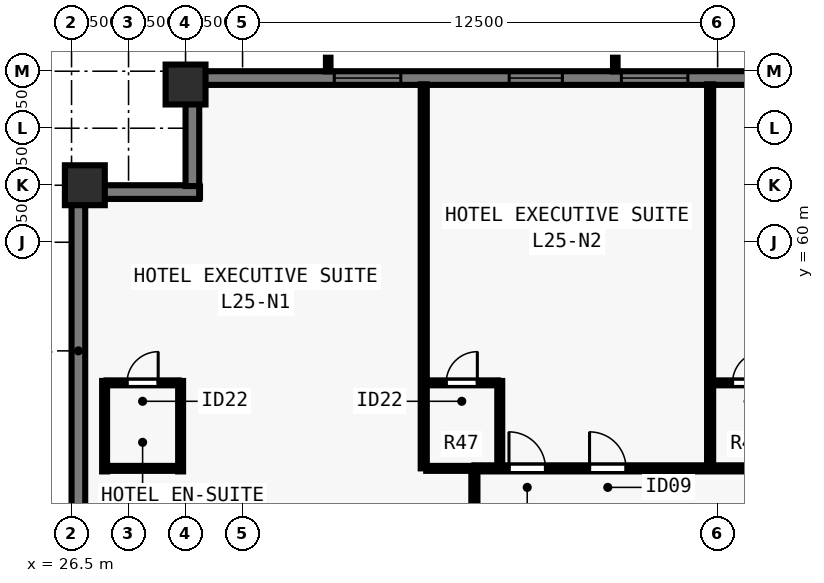
"""IFC4 building model, lengths in metres.
Left out: names, types, materials, properties, quantities, classifications, styles, units other than length and angle.
Written with IfcOpenShell. Run it as: python <this file> out.ifc"""

import sys

from ifc_helpers import new_model, si_unit, direction, frame, frame_2d, origin, origin_2d, place, context, subcontext, project, spatial, rectangle, extrude, element, fill, save


model = new_model("IFC4")
c1 = context("Model", 3, precision=1e-05, world=origin(), true_north=direction((0.0, 1.0)))
c2 = subcontext(c1, "Body", "Model", "MODEL_VIEW")
j1 = project(units=[si_unit("LENGTHUNIT", "METRE"), si_unit("PLANEANGLEUNIT", "RADIAN")], contexts=[c1])
p1 = place(None, origin())
s1 = spatial("IfcSite", under=j1, at=p1, CompositionType="ELEMENT")
p2 = place(p1, origin())
s2 = spatial("IfcBuilding", under=s1, at=p2, CompositionType="ELEMENT")
p3 = place(p2, frame((0.0, 0.0, 93.5)))
s3 = spatial("IfcBuildingStorey", under=s2, at=p3, CompositionType="ELEMENT", Elevation=93.5)
for number, where, z_axis, x_axis in (
    (1, (29.5, 64.15, 0.0), (0.0, 0.0, 1.0), (1.0, 0.0, 0.0)),
    (2, (26.85, 61.5, 0.0), (0.0, 0.0, 1.0), (0.0, 1.0, 0.0)),
):
    element("IfcColumn", number, at=place(p3, frame(where, z_axis=z_axis, x_axis=x_axis)), inside=s3, PredefinedType="COLUMN", context=c2, shape_type="SweptSolid", body=[
        extrude(rectangle(XDim=1.05, YDim=1.05, at=origin_2d()), origin(), (0.0, 0.0, 1.0), 3.5),
    ])
p4 = place(p3, frame((26.68, 16.5, 0.0), z_axis=(0.0, 0.0, 1.0), x_axis=(0.0, 1.0, 0.0)))
e3 = element("IfcWall", 3, at=p4, inside=s3, PredefinedType="SOLIDWALL", context=c2, shape_type="SweptSolid", body=[
    extrude(rectangle(XDim=44.662, YDim=0.36, at=frame_2d((22.331, 0.0))), origin(), (0.0, 0.0, 1.0), 3.24),
])
p5 = place(p4, frame((8.19, 0.0, 0.8)))
e4 = element("IfcOpeningElement", 4, at=p5, cuts=e3, PredefinedType="OPENING", context=c2, shape_type="SweptSolid", body=[
    extrude(rectangle(XDim=1.4, YDim=1.504, at=frame_2d((0.7, 0.752))), frame((0.0, 0.19, 0.0), z_axis=(0.0, -1.0, 0.0), x_axis=(1.0, 0.0, 0.0)), (0.0, 0.0, 1.0), 0.38),
])
p6 = place(p4, frame((11.375, 0.0, 0.8)))
e5 = element("IfcOpeningElement", 5, at=p6, cuts=e3, PredefinedType="OPENING", context=c2, shape_type="SweptSolid", body=[
    extrude(rectangle(XDim=1.75, YDim=1.504, at=frame_2d((0.875, 0.752))), frame((0.0, 0.19, 0.0), z_axis=(0.0, -1.0, 0.0), x_axis=(1.0, 0.0, 0.0)), (0.0, 0.0, 1.0), 0.38),
])
p7 = place(p4, frame((14.911, 0.0, 0.8)))
e6 = element("IfcOpeningElement", 6, at=p7, cuts=e3, PredefinedType="OPENING", context=c2, shape_type="SweptSolid", body=[
    extrude(rectangle(XDim=1.4, YDim=1.504, at=frame_2d((0.7, 0.752))), frame((0.0, 0.19, 0.0), z_axis=(0.0, -1.0, 0.0), x_axis=(1.0, 0.0, 0.0)), (0.0, 0.0, 1.0), 0.38),
])
p8 = place(p4, frame((18.546, 0.0, 0.8)))
e7 = element("IfcOpeningElement", 7, at=p8, cuts=e3, PredefinedType="OPENING", context=c2, shape_type="SweptSolid", body=[
    extrude(rectangle(XDim=1.75, YDim=1.504, at=frame_2d((0.875, 0.752))), frame((0.0, 0.19, 0.0), z_axis=(0.0, -1.0, 0.0), x_axis=(1.0, 0.0, 0.0)), (0.0, 0.0, 1.0), 0.38),
])
p9 = place(p4, frame((22.881, 0.0, 0.8)))
e8 = element("IfcOpeningElement", 8, at=p9, cuts=e3, PredefinedType="OPENING", context=c2, shape_type="SweptSolid", body=[
    extrude(rectangle(XDim=1.4, YDim=1.504, at=frame_2d((0.7, 0.752))), frame((0.0, 0.19, 0.0), z_axis=(0.0, -1.0, 0.0), x_axis=(1.0, 0.0, 0.0)), (0.0, 0.0, 1.0), 0.38),
])
p10 = place(p4, frame((28.351, 0.0, 0.8)))
e9 = element("IfcOpeningElement", 9, at=p10, cuts=e3, PredefinedType="OPENING", context=c2, shape_type="SweptSolid", body=[
    extrude(rectangle(XDim=1.4, YDim=1.504, at=frame_2d((0.7, 0.752))), frame((0.0, 0.19, 0.0), z_axis=(0.0, -1.0, 0.0), x_axis=(1.0, 0.0, 0.0)), (0.0, 0.0, 1.0), 0.38),
])
p11 = place(p4, frame((31.537, 0.0, 0.8)))
e10 = element("IfcOpeningElement", 10, at=p11, cuts=e3, PredefinedType="OPENING", context=c2, shape_type="SweptSolid", body=[
    extrude(rectangle(XDim=1.75, YDim=1.504, at=frame_2d((0.875, 0.752))), frame((0.0, 0.19, 0.0), z_axis=(0.0, -1.0, 0.0), x_axis=(1.0, 0.0, 0.0)), (0.0, 0.0, 1.0), 0.38),
])
p12 = place(p4, frame((35.072, 0.0, 0.8)))
e11 = element("IfcOpeningElement", 11, at=p12, cuts=e3, PredefinedType="OPENING", context=c2, shape_type="SweptSolid", body=[
    extrude(rectangle(XDim=1.4, YDim=1.504, at=frame_2d((0.7, 0.752))), frame((0.0, 0.19, 0.0), z_axis=(0.0, -1.0, 0.0), x_axis=(1.0, 0.0, 0.0)), (0.0, 0.0, 1.0), 0.38),
])
p13 = place(p3, frame((26.5, 61.32, 0.0), z_axis=(0.0, 0.0, 1.0), x_axis=(1.0, 0.0, 0.0)))
e12 = element("IfcWall", 12, at=p13, inside=s3, PredefinedType="SOLIDWALL", context=c2, shape_type="SweptSolid", body=[
    extrude(rectangle(XDim=3.36, YDim=0.36, at=frame_2d((1.68, 0.0))), origin(), (0.0, 0.0, 1.0), 3.24),
])
p14 = place(p3, frame((29.68, 61.478, 0.0), z_axis=(0.0, 0.0, 1.0), x_axis=(0.0, 1.0, 0.0)))
e13 = element("IfcWall", 13, at=p14, inside=s3, PredefinedType="SOLIDWALL", context=c2, shape_type="SweptSolid", body=[
    extrude(rectangle(XDim=2.684, YDim=0.36, at=frame_2d((1.342, 0.0))), origin(), (0.0, 0.0, 1.0), 3.24),
])
p15 = place(p3, frame((29.5, 64.32, 0.0), z_axis=(0.0, 0.0, 1.0), x_axis=(1.0, 0.0, 0.0)))
e14 = element("IfcWall", 14, at=p15, inside=s3, PredefinedType="SOLIDWALL", context=c2, shape_type="SweptSolid", body=[
    extrude(rectangle(XDim=29.162, YDim=0.36, at=frame_2d((14.581, 0.0))), origin(), (0.0, 0.0, 1.0), 3.24),
])
p16 = place(p15, frame((3.914, 0.0, 0.8)))
e15 = element("IfcOpeningElement", 15, at=p16, cuts=e14, PredefinedType="OPENING", context=c2, shape_type="SweptSolid", body=[
    extrude(rectangle(XDim=1.75, YDim=1.504, at=frame_2d((0.875, 0.752))), frame((0.0, 0.19, 0.0), z_axis=(0.0, -1.0, 0.0), x_axis=(1.0, 0.0, 0.0)), (0.0, 0.0, 1.0), 0.38),
])
p17 = place(p15, frame((8.515, 0.0, 0.8)))
e16 = element("IfcOpeningElement", 16, at=p17, cuts=e14, PredefinedType="OPENING", context=c2, shape_type="SweptSolid", body=[
    extrude(rectangle(XDim=1.4, YDim=1.504, at=frame_2d((0.7, 0.752))), frame((0.0, 0.19, 0.0), z_axis=(0.0, -1.0, 0.0), x_axis=(1.0, 0.0, 0.0)), (0.0, 0.0, 1.0), 0.38),
])
p18 = place(p15, frame((11.468, 0.0, 0.8)))
e17 = element("IfcOpeningElement", 17, at=p18, cuts=e14, PredefinedType="OPENING", context=c2, shape_type="SweptSolid", body=[
    extrude(rectangle(XDim=1.75, YDim=1.504, at=frame_2d((0.875, 0.752))), frame((0.0, 0.19, 0.0), z_axis=(0.0, -1.0, 0.0), x_axis=(1.0, 0.0, 0.0)), (0.0, 0.0, 1.0), 0.38),
])
p19 = place(p15, frame((15.219, 0.0, 0.8)))
e18 = element("IfcOpeningElement", 18, at=p19, cuts=e14, PredefinedType="OPENING", context=c2, shape_type="SweptSolid", body=[
    extrude(rectangle(XDim=1.4, YDim=1.504, at=frame_2d((0.7, 0.752))), frame((0.0, 0.19, 0.0), z_axis=(0.0, -1.0, 0.0), x_axis=(1.0, 0.0, 0.0)), (0.0, 0.0, 1.0), 0.38),
])
p20 = place(p15, frame((19.072, 0.0, 0.8)))
e19 = element("IfcOpeningElement", 19, at=p20, cuts=e14, PredefinedType="OPENING", context=c2, shape_type="SweptSolid", body=[
    extrude(rectangle(XDim=1.75, YDim=1.504, at=frame_2d((0.875, 0.752))), frame((0.0, 0.19, 0.0), z_axis=(0.0, -1.0, 0.0), x_axis=(1.0, 0.0, 0.0)), (0.0, 0.0, 1.0), 0.38),
])
p21 = place(p15, frame((23.674, 0.0, 0.8)))
e20 = element("IfcOpeningElement", 20, at=p21, cuts=e14, PredefinedType="OPENING", context=c2, shape_type="SweptSolid", body=[
    extrude(rectangle(XDim=1.4, YDim=1.504, at=frame_2d((0.7, 0.752))), frame((0.0, 0.19, 0.0), z_axis=(0.0, -1.0, 0.0), x_axis=(1.0, 0.0, 0.0)), (0.0, 0.0, 1.0), 0.38),
])
p22 = place(p3, frame((37.1, 54.05, 0.0), z_axis=(0.0, 0.0, 1.0), x_axis=(1.0, 0.0, 0.0)))
e21 = element("IfcWall", 21, at=p22, inside=s3, PredefinedType="PARTITIONING", context=c2, shape_type="SweptSolid", body=[
    extrude(rectangle(XDim=29.8, YDim=0.16, at=frame_2d((14.9, 0.0))), origin(), (0.0, 0.0, 1.0), 3.24),
])
p23 = place(p22, frame((0.91, 0.0, 0.0)))
e22 = element("IfcOpeningElement", 22, at=p23, cuts=e21, PredefinedType="OPENING", context=c2, shape_type="SweptSolid", body=[
    extrude(rectangle(XDim=0.96, YDim=2.15, at=frame_2d((0.48, 1.075))), frame((0.0, 0.09, 0.0), z_axis=(0.0, -1.0, 0.0), x_axis=(1.0, 0.0, 0.0)), (0.0, 0.0, 1.0), 0.18),
])
p24 = place(p22, frame((3.03, 0.0, 0.0)))
e23 = element("IfcOpeningElement", 23, at=p24, cuts=e21, PredefinedType="OPENING", context=c2, shape_type="SweptSolid", body=[
    extrude(rectangle(XDim=0.96, YDim=2.15, at=frame_2d((0.48, 1.075))), frame((0.0, 0.09, 0.0), z_axis=(0.0, -1.0, 0.0), x_axis=(1.0, 0.0, 0.0)), (0.0, 0.0, 1.0), 0.18),
])
p25 = place(p22, frame((11.39, 0.0, 0.0)))
e24 = element("IfcOpeningElement", 24, at=p25, cuts=e21, PredefinedType="OPENING", context=c2, shape_type="SweptSolid", body=[
    extrude(rectangle(XDim=0.96, YDim=2.15, at=frame_2d((0.48, 1.075))), frame((0.0, 0.09, 0.0), z_axis=(0.0, -1.0, 0.0), x_axis=(1.0, 0.0, 0.0)), (0.0, 0.0, 1.0), 0.18),
])
p26 = place(p22, frame((19.75, 0.0, 0.0)))
e25 = element("IfcOpeningElement", 25, at=p26, cuts=e21, PredefinedType="OPENING", context=c2, shape_type="SweptSolid", body=[
    extrude(rectangle(XDim=0.96, YDim=2.15, at=frame_2d((0.48, 1.075))), frame((0.0, 0.09, 0.0), z_axis=(0.0, -1.0, 0.0), x_axis=(1.0, 0.0, 0.0)), (0.0, 0.0, 1.0), 0.18),
])
p27 = place(p22, frame((26.931, 0.0, 0.0)))
e26 = element("IfcOpeningElement", 26, at=p27, cuts=e21, PredefinedType="OPENING", context=c2, shape_type="SweptSolid", body=[
    extrude(rectangle(XDim=0.96, YDim=2.15, at=frame_2d((0.48, 1.075))), frame((0.0, 0.09, 0.0), z_axis=(0.0, -1.0, 0.0), x_axis=(1.0, 0.0, 0.0)), (0.0, 0.0, 1.0), 0.18),
])
p28 = place(p22, frame((28.48, 0.0, 0.0)))
e27 = element("IfcOpeningElement", 27, at=p28, cuts=e21, PredefinedType="OPENING", context=c2, shape_type="SweptSolid", body=[
    extrude(rectangle(XDim=0.96, YDim=2.15, at=frame_2d((0.48, 1.075))), frame((0.0, 0.09, 0.0), z_axis=(0.0, -1.0, 0.0), x_axis=(1.0, 0.0, 0.0)), (0.0, 0.0, 1.0), 0.18),
])
p29 = place(p3, frame((37.1, 24.015, 0.0), z_axis=(0.0, 0.0, 1.0), x_axis=(0.0, 1.0, 0.0)))
e28 = element("IfcWall", 28, at=p29, inside=s3, PredefinedType="PARTITIONING", context=c2, shape_type="SweptSolid", body=[
    extrude(rectangle(XDim=29.97, YDim=0.16, at=frame_2d((14.985, 0.0))), origin(), (0.0, 0.0, 1.0), 3.24),
])
p30 = place(p29, frame((8.134, 0.0, 0.0)))
e29 = element("IfcOpeningElement", 29, at=p30, cuts=e28, PredefinedType="OPENING", context=c2, shape_type="SweptSolid", body=[
    extrude(rectangle(XDim=0.96, YDim=2.15, at=frame_2d((0.48, 1.075))), frame((0.0, 0.09, 0.0), z_axis=(0.0, -1.0, 0.0), x_axis=(1.0, 0.0, 0.0)), (0.0, 0.0, 1.0), 0.18),
])
p31 = place(p29, frame((22.934, 0.0, 0.0)))
e30 = element("IfcOpeningElement", 30, at=p31, cuts=e28, PredefinedType="OPENING", context=c2, shape_type="SweptSolid", body=[
    extrude(rectangle(XDim=0.96, YDim=2.15, at=frame_2d((0.48, 1.075))), frame((0.0, 0.09, 0.0), z_axis=(0.0, -1.0, 0.0), x_axis=(1.0, 0.0, 0.0)), (0.0, 0.0, 1.0), 0.18),
])
for number, where, z_axis, x_axis in (
    (31, (27.37, 53.97, 0.0), (0.0, 0.0, 1.0), (0.0, 1.0, 0.0)),
    (32, (29.37, 53.97, 0.0), (0.0, 0.0, 1.0), (0.0, 1.0, 0.0)),
):
    element("IfcWall", number, at=place(p3, frame(where, z_axis=z_axis, x_axis=x_axis)), inside=s3, PredefinedType="PLUMBINGWALL", context=c2, shape_type="SweptSolid", body=[
        extrude(rectangle(XDim=2.38, YDim=0.13, at=frame_2d((1.19, 0.0))), origin(), (0.0, 0.0, 1.0), 3.24),
    ])
p32 = place(p3, frame((27.42, 56.3, 0.0), z_axis=(0.0, 0.0, 1.0), x_axis=(1.0, 0.0, 0.0)))
e33 = element("IfcWall", 33, at=p32, inside=s3, PredefinedType="PLUMBINGWALL", context=c2, shape_type="SweptSolid", body=[
    extrude(rectangle(XDim=1.9, YDim=0.13, at=frame_2d((0.95, 0.0))), origin(), (0.0, 0.0, 1.0), 3.24),
])
p33 = place(p32, frame((0.54, 0.0, 0.0)))
e34 = element("IfcOpeningElement", 34, at=p33, cuts=e33, PredefinedType="OPENING", context=c2, shape_type="SweptSolid", body=[
    extrude(rectangle(XDim=0.82, YDim=2.1, at=frame_2d((0.41, 1.05))), frame((0.0, 0.075, 0.0), z_axis=(0.0, -1.0, 0.0), x_axis=(1.0, 0.0, 0.0)), (0.0, 0.0, 1.0), 0.15),
])
p34 = place(p3, frame((27.42, 54.05, 0.0), z_axis=(0.0, 0.0, 1.0), x_axis=(1.0, 0.0, 0.0)))
e35 = element("IfcWall", 35, at=p34, inside=s3, PredefinedType="PLUMBINGWALL", context=c2, shape_type="SweptSolid", body=[
    extrude(rectangle(XDim=1.9, YDim=0.13, at=frame_2d((0.95, 0.0))), origin(), (0.0, 0.0, 1.0), 3.24),
])
p35 = place(p3, frame((35.768, 54.05, 0.0), z_axis=(0.0, 0.0, 1.0), x_axis=(0.0, 1.0, 0.0)))
e36 = element("IfcWall", 36, at=p35, inside=s3, PredefinedType="PARTITIONING", context=c2, shape_type="SweptSolid", body=[
    extrude(rectangle(XDim=10.105, YDim=0.16, at=frame_2d((5.052, 0.0))), origin(), (0.0, 0.0, 1.0), 2.399),
])
p36 = place(p3, frame((37.768, 54.115, 0.0), z_axis=(0.0, 0.0, 1.0), x_axis=(0.0, 1.0, 0.0)))
e37 = element("IfcWall", 37, at=p36, inside=s3, PredefinedType="PLUMBINGWALL", context=c2, shape_type="SweptSolid", body=[
    extrude(rectangle(XDim=2.235, YDim=0.13, at=frame_2d((1.118, 0.0))), origin(), (0.0, 0.0, 1.0), 2.399),
])
p37 = place(p3, frame((35.833, 56.3, 0.0), z_axis=(0.0, 0.0, 1.0), x_axis=(1.0, 0.0, 0.0)))
e38 = element("IfcWall", 38, at=p37, inside=s3, PredefinedType="PLUMBINGWALL", context=c2, shape_type="SweptSolid", body=[
    extrude(rectangle(XDim=1.885, YDim=0.13, at=frame_2d((0.942, 0.0))), origin(), (0.0, 0.0, 1.0), 3.24),
])
p38 = place(p37, frame((0.525, 0.0, 0.0)))
e39 = element("IfcOpeningElement", 39, at=p38, cuts=e38, PredefinedType="OPENING", context=c2, shape_type="SweptSolid", body=[
    extrude(rectangle(XDim=0.82, YDim=2.1, at=frame_2d((0.41, 1.05))), frame((0.0, 0.075, 0.0), z_axis=(0.0, -1.0, 0.0), x_axis=(1.0, 0.0, 0.0)), (0.0, 0.0, 1.0), 0.15),
])
p39 = place(p3, frame((35.833, 54.05, 0.0), z_axis=(0.0, 0.0, 1.0), x_axis=(1.0, 0.0, 0.0)))
e40 = element("IfcWall", 40, at=p39, inside=s3, PredefinedType="PLUMBINGWALL", context=c2, shape_type="SweptSolid", body=[
    extrude(rectangle(XDim=1.188, YDim=0.13, at=frame_2d((0.594, 0.0))), origin(), (0.0, 0.0, 1.0), 3.24),
])
p40 = place(p3, frame((43.302, 54.115, 0.0), z_axis=(0.0, 0.0, 1.0), x_axis=(0.0, 1.0, 0.0)))
e41 = element("IfcWall", 41, at=p40, inside=s3, PredefinedType="PARTITIONING", context=c2, shape_type="SweptSolid", body=[
    extrude(rectangle(XDim=10.04, YDim=0.16, at=frame_2d((5.02, 0.0))), origin(), (0.0, 0.0, 1.0), 3.24),
])
p41 = place(p3, frame((43.367, 56.3, 0.0), z_axis=(0.0, 0.0, 1.0), x_axis=(1.0, 0.0, 0.0)))
e42 = element("IfcWall", 42, at=p41, inside=s3, PredefinedType="PLUMBINGWALL", context=c2, shape_type="SweptSolid", body=[
    extrude(rectangle(XDim=1.885, YDim=0.13, at=frame_2d((0.942, 0.0))), origin(), (0.0, 0.0, 1.0), 3.24),
])
p42 = place(p41, frame((0.525, 0.0, 0.0)))
e43 = element("IfcOpeningElement", 43, at=p42, cuts=e42, PredefinedType="OPENING", context=c2, shape_type="SweptSolid", body=[
    extrude(rectangle(XDim=0.82, YDim=2.1, at=frame_2d((0.41, 1.05))), frame((0.0, 0.075, 0.0), z_axis=(0.0, -1.0, 0.0), x_axis=(1.0, 0.0, 0.0)), (0.0, 0.0, 1.0), 0.15),
])
p43 = place(p16, origin())
e44 = element("IfcWindow", 44, at=p43, inside=s3, PartitioningType="SINGLE_PANEL", PredefinedType="WINDOW", context=c2, shape_type="SweptSolid", body=[
    extrude(rectangle(XDim=1.75, YDim=1.504, at=frame_2d((0.875, 0.752))), frame((0.0, -0.05, 0.0), z_axis=(0.0, -1.0, 0.0), x_axis=(1.0, 0.0, 0.0)), (0.0, 0.0, 1.0), 0.06),
])
fill(e15, e44)
p44 = place(p17, origin())
e45 = element("IfcWindow", 45, at=p44, inside=s3, PartitioningType="SINGLE_PANEL", PredefinedType="WINDOW", context=c2, shape_type="SweptSolid", body=[
    extrude(rectangle(XDim=1.4, YDim=1.504, at=frame_2d((0.7, 0.752))), frame((0.0, -0.05, 0.0), z_axis=(0.0, -1.0, 0.0), x_axis=(1.0, 0.0, 0.0)), (0.0, 0.0, 1.0), 0.06),
])
fill(e16, e45)
p45 = place(p18, origin())
e46 = element("IfcWindow", 46, at=p45, inside=s3, PartitioningType="SINGLE_PANEL", PredefinedType="WINDOW", context=c2, shape_type="SweptSolid", body=[
    extrude(rectangle(XDim=1.75, YDim=1.504, at=frame_2d((0.875, 0.752))), frame((0.0, -0.05, 0.0), z_axis=(0.0, -1.0, 0.0), x_axis=(1.0, 0.0, 0.0)), (0.0, 0.0, 1.0), 0.06),
])
fill(e17, e46)
p46 = place(p33, origin())
e47 = element("IfcDoor", 47, at=p46, inside=s3, OperationType="SINGLE_SWING_RIGHT", PredefinedType="DOOR", context=c2, shape_type="SweptSolid", body=[
    extrude(rectangle(XDim=0.82, YDim=2.1, at=frame_2d((0.41, 1.05))), frame((0.0, 0.025, 0.0), z_axis=(0.0, -1.0, 0.0), x_axis=(1.0, 0.0, 0.0)), (0.0, 0.0, 1.0), 0.05),
])
fill(e34, e47)
p47 = place(p23, origin())
e48 = element("IfcDoor", 48, at=p47, inside=s3, OperationType="SINGLE_SWING_LEFT", PredefinedType="DOOR", context=c2, shape_type="SweptSolid", body=[
    extrude(rectangle(XDim=0.96, YDim=2.15, at=frame_2d((0.48, 1.075))), frame((0.0, 0.025, 0.0), z_axis=(0.0, -1.0, 0.0), x_axis=(1.0, 0.0, 0.0)), (0.0, 0.0, 1.0), 0.05),
])
fill(e22, e48)
p48 = place(p38, origin())
e49 = element("IfcDoor", 49, at=p48, inside=s3, OperationType="SINGLE_SWING_RIGHT", PredefinedType="DOOR", context=c2, shape_type="SweptSolid", body=[
    extrude(rectangle(XDim=0.82, YDim=2.1, at=frame_2d((0.41, 1.05))), frame((0.0, 0.025, 0.0), z_axis=(0.0, -1.0, 0.0), x_axis=(1.0, 0.0, 0.0)), (0.0, 0.0, 1.0), 0.05),
])
fill(e39, e49)
p49 = place(p24, origin())
e50 = element("IfcDoor", 50, at=p49, inside=s3, OperationType="SINGLE_SWING_LEFT", PredefinedType="DOOR", context=c2, shape_type="SweptSolid", body=[
    extrude(rectangle(XDim=0.96, YDim=2.15, at=frame_2d((0.48, 1.075))), frame((0.0, 0.025, 0.0), z_axis=(0.0, -1.0, 0.0), x_axis=(1.0, 0.0, 0.0)), (0.0, 0.0, 1.0), 0.05),
])
fill(e23, e50)
p50 = place(p42, origin())
e51 = element("IfcDoor", 51, at=p50, inside=s3, OperationType="SINGLE_SWING_RIGHT", PredefinedType="DOOR", context=c2, shape_type="SweptSolid", body=[
    extrude(rectangle(XDim=0.82, YDim=2.1, at=frame_2d((0.41, 1.05))), frame((0.0, 0.025, 0.0), z_axis=(0.0, -1.0, 0.0), x_axis=(1.0, 0.0, 0.0)), (0.0, 0.0, 1.0), 0.05),
])
fill(e43, e51)
save(model, sys.argv[1])
